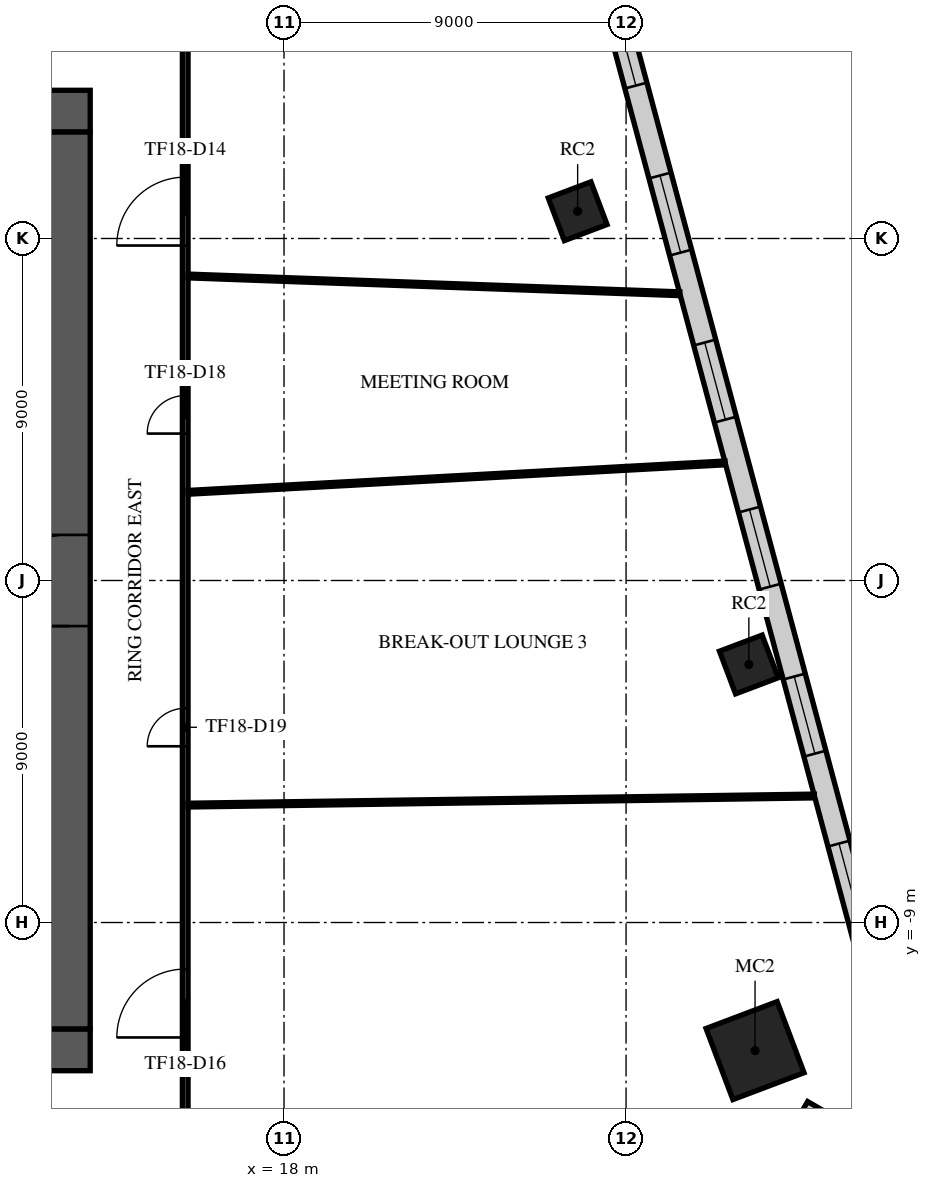
"""IFC4 building model, lengths in metres.
Left out: names, types, materials, properties, quantities, classifications, styles, units other than length and angle.
Written with IfcOpenShell. Run it as: python <this file> out.ifc"""

import sys

from ifc_helpers import new_model, si_unit, direction, frame, frame_2d, origin, origin_2d, place, context, subcontext, project, spatial, rectangle, extrude, element, fill, save


model = new_model("IFC4")
c1 = context("Model", 3, precision=1e-05, world=origin(), true_north=direction((0.0, 1.0)))
c2 = subcontext(c1, "Body", "Model", "MODEL_VIEW")
j1 = project(units=[si_unit("LENGTHUNIT", "METRE"), si_unit("PLANEANGLEUNIT", "RADIAN")], contexts=[c1])
p1 = place(None, origin())
s1 = spatial("IfcSite", under=j1, at=p1, CompositionType="ELEMENT")
p2 = place(p1, origin())
s2 = spatial("IfcBuilding", under=s1, at=p2, CompositionType="ELEMENT")
p3 = place(p2, frame((0.0, 0.0, 82.1)))
s3 = spatial("IfcBuildingStorey", under=s2, at=p3, CompositionType="ELEMENT", Elevation=82.1)
p4 = place(p3, frame((30.394, -12.371, -0.42), z_axis=(0.0, 0.0, 1.0), x_axis=(0.935491525991, 0.353349125935, 0.0)))
e1 = element("IfcColumn", 1, at=p4, inside=s3, PredefinedType="COLUMN", context=c2, shape_type="SweptSolid", body=[
    extrude(rectangle(XDim=2.0, YDim=2.0, at=origin_2d()), origin(), (0.0, 0.0, 1.0), 4.42),
])
for number, where, z_axis, x_axis in (
    (2, (30.231, -2.21, -0.42), (0.0, 0.0, 1.0), (0.935, 0.353, 0.0)),
    (3, (25.726, 9.717, -0.42), (0.0, 0.0, 1.0), (0.935, 0.353, 0.0)),
):
    element("IfcColumn", number, at=place(p3, frame(where, z_axis=z_axis, x_axis=x_axis)), inside=s3, PredefinedType="COLUMN", context=c2, shape_type="SweptSolid", body=[
        extrude(rectangle(XDim=1.2, YDim=1.2, at=origin_2d()), origin(), (0.0, 0.0, 1.0), 4.42),
    ])
p5 = place(p3, frame((-12.9, 12.35, 0.0), z_axis=(0.0, 0.0, 1.0), x_axis=(1.0, 0.0, 0.0)))
e4 = element("IfcWall", 4, at=p5, inside=s3, PredefinedType="SHEAR", context=c2, shape_type="SweptSolid", body=[
    extrude(rectangle(XDim=25.8, YDim=1.1, at=frame_2d((12.9, 0.0))), origin(), (0.0, 0.0, 1.0), 3.58),
])
p6 = place(p5, frame((11.7, 0.0, 0.0)))
e5 = element("IfcOpeningElement", 5, at=p6, cuts=e4, PredefinedType="OPENING", context=c2, shape_type="SweptSolid", body=[
    extrude(rectangle(XDim=2.4, YDim=2.4, at=frame_2d((1.2, 1.2))), frame((0.0, 0.56, 0.0), z_axis=(0.0, -1.0, 0.0), x_axis=(1.0, 0.0, 0.0)), (0.0, 0.0, 1.0), 1.12),
])
p7 = place(p5, frame((22.525, 0.0, 0.0)))
e6 = element("IfcOpeningElement", 6, at=p7, cuts=e4, PredefinedType="OPENING", context=c2, shape_type="SweptSolid", body=[
    extrude(rectangle(XDim=1.2, YDim=2.1, at=frame_2d((0.6, 1.05))), frame((0.0, 0.56, 0.0), z_axis=(0.0, -1.0, 0.0), x_axis=(1.0, 0.0, 0.0)), (0.0, 0.0, 1.0), 1.12),
])
p8 = place(p5, frame((1.5, 0.0, 0.0)))
e7 = element("IfcOpeningElement", 7, at=p8, cuts=e4, PredefinedType="OPENING", context=c2, shape_type="SweptSolid", body=[
    extrude(rectangle(XDim=1.0, YDim=2.1, at=frame_2d((0.5, 1.05))), frame((0.0, 0.56, 0.0), z_axis=(0.0, -1.0, 0.0), x_axis=(1.0, 0.0, 0.0)), (0.0, 0.0, 1.0), 1.12),
])
p9 = place(p3, frame((-12.9, -12.35, 0.0), z_axis=(0.0, 0.0, 1.0), x_axis=(1.0, 0.0, 0.0)))
e8 = element("IfcWall", 8, at=p9, inside=s3, PredefinedType="SHEAR", context=c2, shape_type="SweptSolid", body=[
    extrude(rectangle(XDim=25.8, YDim=1.1, at=frame_2d((12.9, 0.0))), origin(), (0.0, 0.0, 1.0), 3.58),
])
p10 = place(p9, frame((7.8, 0.0, 0.0)))
e9 = element("IfcOpeningElement", 9, at=p10, cuts=e8, PredefinedType="OPENING", context=c2, shape_type="SweptSolid", body=[
    extrude(rectangle(XDim=2.0, YDim=2.1, at=frame_2d((1.0, 1.05))), frame((0.0, 0.56, 0.0), z_axis=(0.0, -1.0, 0.0), x_axis=(1.0, 0.0, 0.0)), (0.0, 0.0, 1.0), 1.12),
])
p11 = place(p9, frame((17.925, 0.0, 0.0)))
e10 = element("IfcOpeningElement", 10, at=p11, cuts=e8, PredefinedType="OPENING", context=c2, shape_type="SweptSolid", body=[
    extrude(rectangle(XDim=1.2, YDim=2.1, at=frame_2d((0.6, 1.05))), frame((0.0, 0.56, 0.0), z_axis=(0.0, -1.0, 0.0), x_axis=(1.0, 0.0, 0.0)), (0.0, 0.0, 1.0), 1.12),
])
p12 = place(p9, frame((2.075, 0.0, 0.0)))
e11 = element("IfcOpeningElement", 11, at=p12, cuts=e8, PredefinedType="OPENING", context=c2, shape_type="SweptSolid", body=[
    extrude(rectangle(XDim=1.2, YDim=2.1, at=frame_2d((0.6, 1.05))), frame((0.0, 0.56, 0.0), z_axis=(0.0, -1.0, 0.0), x_axis=(1.0, 0.0, 0.0)), (0.0, 0.0, 1.0), 1.12),
])
p13 = place(p9, frame((22.525, 0.0, 0.0)))
e12 = element("IfcOpeningElement", 12, at=p13, cuts=e8, PredefinedType="OPENING", context=c2, shape_type="SweptSolid", body=[
    extrude(rectangle(XDim=1.2, YDim=2.1, at=frame_2d((0.6, 1.05))), frame((0.0, 0.56, 0.0), z_axis=(0.0, -1.0, 0.0), x_axis=(1.0, 0.0, 0.0)), (0.0, 0.0, 1.0), 1.12),
])
p14 = place(p3, frame((12.35, -11.8, 0.0), z_axis=(0.0, 0.0, 1.0), x_axis=(0.0, 1.0, 0.0)))
e13 = element("IfcWall", 13, at=p14, inside=s3, PredefinedType="SHEAR", context=c2, shape_type="SweptSolid", body=[
    extrude(rectangle(XDim=23.6, YDim=1.1, at=frame_2d((11.8, 0.0))), origin(), (0.0, 0.0, 1.0), 3.58),
])
p15 = place(p14, frame((10.6, 0.0, 0.0)))
e14 = element("IfcOpeningElement", 14, at=p15, cuts=e13, PredefinedType="OPENING", context=c2, shape_type="SweptSolid", body=[
    extrude(rectangle(XDim=2.4, YDim=2.4, at=frame_2d((1.2, 1.2))), frame((0.0, 0.56, 0.0), z_axis=(0.0, -1.0, 0.0), x_axis=(1.0, 0.0, 0.0)), (0.0, 0.0, 1.0), 1.12),
])
p16 = place(p3, frame((31.628, -13.972, 0.0), z_axis=(0.0, 0.0, 1.0), x_axis=(0.866022959057, -0.500004234368, 0.0)))
e15 = element("IfcWall", 15, at=p16, inside=s3, PredefinedType="STANDARD", context=c2, shape_type="SweptSolid", body=[
    extrude(rectangle(XDim=2.5, YDim=0.6, at=frame_2d((1.25, 0.0))), origin(), (0.0, 0.0, 1.0), 3.58),
])
p17 = place(p3, frame((34.609, -14.409, 0.0), z_axis=(0.0, 0.0, 1.0), x_axis=(-0.258819814566, 0.965925620112, 0.0)))
e16 = element("IfcWall", 16, at=p17, inside=s3, PredefinedType="STANDARD", context=c2, shape_type="SweptSolid", body=[
    extrude(rectangle(XDim=45.376, YDim=0.6, at=frame_2d((22.688, 0.0))), origin(), (0.0, 0.0, 1.0), 3.58),
])
p18 = place(p17, frame((1.163, 0.0, 0.9)))
e17 = element("IfcOpeningElement", 17, at=p18, cuts=e16, PredefinedType="OPENING", context=c2, shape_type="SweptSolid", body=[
    extrude(rectangle(XDim=2.1, YDim=2.1, at=frame_2d((1.05, 1.05))), frame((0.0, 0.31, 0.0), z_axis=(0.0, -1.0, 0.0), x_axis=(1.0, 0.0, 0.0)), (0.0, 0.0, 1.0), 0.62),
])
p19 = place(p17, frame((5.651, 0.0, 0.9)))
e18 = element("IfcOpeningElement", 18, at=p19, cuts=e16, PredefinedType="OPENING", context=c2, shape_type="SweptSolid", body=[
    extrude(rectangle(XDim=2.1, YDim=2.1, at=frame_2d((1.05, 1.05))), frame((0.0, 0.31, 0.0), z_axis=(0.0, -1.0, 0.0), x_axis=(1.0, 0.0, 0.0)), (0.0, 0.0, 1.0), 0.62),
])
p20 = place(p17, frame((10.201, 0.0, 0.9)))
e19 = element("IfcOpeningElement", 19, at=p20, cuts=e16, PredefinedType="OPENING", context=c2, shape_type="SweptSolid", body=[
    extrude(rectangle(XDim=2.1, YDim=2.1, at=frame_2d((1.05, 1.05))), frame((0.0, 0.31, 0.0), z_axis=(0.0, -1.0, 0.0), x_axis=(1.0, 0.0, 0.0)), (0.0, 0.0, 1.0), 0.62),
])
p21 = place(p17, frame((14.751, 0.0, 0.9)))
e20 = element("IfcOpeningElement", 20, at=p21, cuts=e16, PredefinedType="OPENING", context=c2, shape_type="SweptSolid", body=[
    extrude(rectangle(XDim=2.1, YDim=2.1, at=frame_2d((1.05, 1.05))), frame((0.0, 0.31, 0.0), z_axis=(0.0, -1.0, 0.0), x_axis=(1.0, 0.0, 0.0)), (0.0, 0.0, 1.0), 0.62),
])
p22 = place(p17, frame((19.301, 0.0, 0.9)))
e21 = element("IfcOpeningElement", 21, at=p22, cuts=e16, PredefinedType="OPENING", context=c2, shape_type="SweptSolid", body=[
    extrude(rectangle(XDim=2.1, YDim=2.1, at=frame_2d((1.05, 1.05))), frame((0.0, 0.31, 0.0), z_axis=(0.0, -1.0, 0.0), x_axis=(1.0, 0.0, 0.0)), (0.0, 0.0, 1.0), 0.62),
])
p23 = place(p17, frame((23.851, 0.0, 0.9)))
e22 = element("IfcOpeningElement", 22, at=p23, cuts=e16, PredefinedType="OPENING", context=c2, shape_type="SweptSolid", body=[
    extrude(rectangle(XDim=2.1, YDim=2.1, at=frame_2d((1.05, 1.05))), frame((0.0, 0.31, 0.0), z_axis=(0.0, -1.0, 0.0), x_axis=(1.0, 0.0, 0.0)), (0.0, 0.0, 1.0), 0.62),
])
p24 = place(p17, frame((28.401, 0.0, 0.9)))
e23 = element("IfcOpeningElement", 23, at=p24, cuts=e16, PredefinedType="OPENING", context=c2, shape_type="SweptSolid", body=[
    extrude(rectangle(XDim=2.1, YDim=2.1, at=frame_2d((1.05, 1.05))), frame((0.0, 0.31, 0.0), z_axis=(0.0, -1.0, 0.0), x_axis=(1.0, 0.0, 0.0)), (0.0, 0.0, 1.0), 0.62),
])
p25 = place(p17, frame((32.951, 0.0, 0.9)))
e24 = element("IfcOpeningElement", 24, at=p25, cuts=e16, PredefinedType="OPENING", context=c2, shape_type="SweptSolid", body=[
    extrude(rectangle(XDim=2.1, YDim=2.1, at=frame_2d((1.05, 1.05))), frame((0.0, 0.31, 0.0), z_axis=(0.0, -1.0, 0.0), x_axis=(1.0, 0.0, 0.0)), (0.0, 0.0, 1.0), 0.62),
])
p26 = place(p17, frame((37.501, 0.0, 0.9)))
e25 = element("IfcOpeningElement", 25, at=p26, cuts=e16, PredefinedType="OPENING", context=c2, shape_type="SweptSolid", body=[
    extrude(rectangle(XDim=2.1, YDim=2.1, at=frame_2d((1.05, 1.05))), frame((0.0, 0.31, 0.0), z_axis=(0.0, -1.0, 0.0), x_axis=(1.0, 0.0, 0.0)), (0.0, 0.0, 1.0), 0.62),
])
p27 = place(p17, frame((42.051, 0.0, 0.9)))
e26 = element("IfcOpeningElement", 26, at=p27, cuts=e16, PredefinedType="OPENING", context=c2, shape_type="SweptSolid", body=[
    extrude(rectangle(XDim=2.1, YDim=2.1, at=frame_2d((1.05, 1.05))), frame((0.0, 0.31, 0.0), z_axis=(0.0, -1.0, 0.0), x_axis=(1.0, 0.0, 0.0)), (0.0, 0.0, 1.0), 0.62),
])
p28 = place(p3, frame((15.4, -15.325, 0.0), z_axis=(0.0, 0.0, 1.0), x_axis=(0.0, 1.0, 0.0)))
e27 = element("IfcWall", 27, at=p28, inside=s3, PredefinedType="PARTITIONING", context=c2, shape_type="SweptSolid", body=[
    extrude(rectangle(XDim=30.65, YDim=0.15, at=frame_2d((15.325, 0.0))), origin(), (0.0, 0.0, 1.0), 3.08),
])
p29 = place(p28, frame((24.14, 0.0, 0.0)))
e28 = element("IfcOpeningElement", 28, at=p29, cuts=e27, PredefinedType="OPENING", context=c2, shape_type="SweptSolid", body=[
    extrude(rectangle(XDim=1.8, YDim=2.1, at=frame_2d((0.9, 1.05))), frame((0.0, 0.085, 0.0), z_axis=(0.0, -1.0, 0.0), x_axis=(1.0, 0.0, 0.0)), (0.0, 0.0, 1.0), 0.17),
])
p30 = place(p28, frame((3.3, 0.0, 0.0)))
e29 = element("IfcOpeningElement", 29, at=p30, cuts=e27, PredefinedType="OPENING", context=c2, shape_type="SweptSolid", body=[
    extrude(rectangle(XDim=1.8, YDim=2.1, at=frame_2d((0.9, 1.05))), frame((0.0, 0.085, 0.0), z_axis=(0.0, -1.0, 0.0), x_axis=(1.0, 0.0, 0.0)), (0.0, 0.0, 1.0), 0.17),
])
p31 = place(p28, frame((19.191, 0.0, 0.0)))
e30 = element("IfcOpeningElement", 30, at=p31, cuts=e27, PredefinedType="OPENING", context=c2, shape_type="SweptSolid", body=[
    extrude(rectangle(XDim=1.0, YDim=2.1, at=frame_2d((0.5, 1.05))), frame((0.0, 0.085, 0.0), z_axis=(0.0, -1.0, 0.0), x_axis=(1.0, 0.0, 0.0)), (0.0, 0.0, 1.0), 0.17),
])
p32 = place(p28, frame((10.963, 0.0, 0.0)))
e31 = element("IfcOpeningElement", 31, at=p32, cuts=e27, PredefinedType="OPENING", context=c2, shape_type="SweptSolid", body=[
    extrude(rectangle(XDim=1.0, YDim=2.1, at=frame_2d((0.5, 1.05))), frame((0.0, 0.085, 0.0), z_axis=(0.0, -1.0, 0.0), x_axis=(1.0, 0.0, 0.0)), (0.0, 0.0, 1.0), 0.17),
])
p33 = place(p3, frame((15.476, -5.911, 0.0), z_axis=(0.0, 0.0, 1.0), x_axis=(0.999893970636, 0.014561850324, 0.0)))
e32 = element("IfcWall", 32, at=p33, inside=s3, PredefinedType="PARTITIONING", context=c2, shape_type="SweptSolid", body=[
    extrude(rectangle(XDim=16.481, YDim=0.1, at=frame_2d((8.24, 0.0))), origin(), (0.0, 0.0, 1.0), 3.58),
])
p34 = place(p3, frame((15.478, 2.32, 0.0), z_axis=(0.0, 0.0, 1.0), x_axis=(0.998502061924, 0.054714096293, 0.0)))
e33 = element("IfcWall", 33, at=p34, inside=s3, PredefinedType="PARTITIONING", context=c2, shape_type="SweptSolid", body=[
    extrude(rectangle(XDim=14.149, YDim=0.1, at=frame_2d((7.075, 0.0))), origin(), (0.0, 0.0, 1.0), 3.58),
])
p35 = place(p3, frame((15.477, 8.013, 0.0), z_axis=(0.0, 0.0, 1.0), x_axis=(0.999348235862, -0.036098524609, 0.0)))
e34 = element("IfcWall", 34, at=p35, inside=s3, PredefinedType="PARTITIONING", context=c2, shape_type="SweptSolid", body=[
    extrude(rectangle(XDim=12.945, YDim=0.1, at=frame_2d((6.472, 0.0))), origin(), (0.0, 0.0, 1.0), 3.58),
])
p36 = place(p15, origin())
e35 = element("IfcDoor", 35, at=p36, inside=s3, OperationType="SINGLE_SWING_LEFT", PredefinedType="DOOR", context=c2, shape_type="SweptSolid", body=[
    extrude(rectangle(XDim=2.4, YDim=2.4, at=frame_2d((1.2, 1.2))), frame((0.0, 0.025, 0.0), z_axis=(0.0, -1.0, 0.0), x_axis=(1.0, 0.0, 0.0)), (0.0, 0.0, 1.0), 0.05),
])
fill(e14, e35)
p37 = place(p19, origin())
e36 = element("IfcWindow", 36, at=p37, inside=s3, PartitioningType="SINGLE_PANEL", PredefinedType="WINDOW", context=c2, shape_type="SweptSolid", body=[
    extrude(rectangle(XDim=2.1, YDim=2.1, at=frame_2d((1.05, 1.05))), frame((0.0, 0.03, 0.0), z_axis=(0.0, -1.0, 0.0), x_axis=(1.0, 0.0, 0.0)), (0.0, 0.0, 1.0), 0.06),
])
fill(e18, e36)
p38 = place(p20, origin())
e37 = element("IfcWindow", 37, at=p38, inside=s3, PartitioningType="SINGLE_PANEL", PredefinedType="WINDOW", context=c2, shape_type="SweptSolid", body=[
    extrude(rectangle(XDim=2.1, YDim=2.1, at=frame_2d((1.05, 1.05))), frame((0.0, 0.03, 0.0), z_axis=(0.0, -1.0, 0.0), x_axis=(1.0, 0.0, 0.0)), (0.0, 0.0, 1.0), 0.06),
])
fill(e19, e37)
p39 = place(p21, origin())
e38 = element("IfcWindow", 38, at=p39, inside=s3, PartitioningType="SINGLE_PANEL", PredefinedType="WINDOW", context=c2, shape_type="SweptSolid", body=[
    extrude(rectangle(XDim=2.1, YDim=2.1, at=frame_2d((1.05, 1.05))), frame((0.0, 0.03, 0.0), z_axis=(0.0, -1.0, 0.0), x_axis=(1.0, 0.0, 0.0)), (0.0, 0.0, 1.0), 0.06),
])
fill(e20, e38)
p40 = place(p22, origin())
e39 = element("IfcWindow", 39, at=p40, inside=s3, PartitioningType="SINGLE_PANEL", PredefinedType="WINDOW", context=c2, shape_type="SweptSolid", body=[
    extrude(rectangle(XDim=2.1, YDim=2.1, at=frame_2d((1.05, 1.05))), frame((0.0, 0.03, 0.0), z_axis=(0.0, -1.0, 0.0), x_axis=(1.0, 0.0, 0.0)), (0.0, 0.0, 1.0), 0.06),
])
fill(e21, e39)
p41 = place(p23, origin())
e40 = element("IfcWindow", 40, at=p41, inside=s3, PartitioningType="SINGLE_PANEL", PredefinedType="WINDOW", context=c2, shape_type="SweptSolid", body=[
    extrude(rectangle(XDim=2.1, YDim=2.1, at=frame_2d((1.05, 1.05))), frame((0.0, 0.03, 0.0), z_axis=(0.0, -1.0, 0.0), x_axis=(1.0, 0.0, 0.0)), (0.0, 0.0, 1.0), 0.06),
])
fill(e22, e40)
p42 = place(p24, origin())
e41 = element("IfcWindow", 41, at=p42, inside=s3, PartitioningType="SINGLE_PANEL", PredefinedType="WINDOW", context=c2, shape_type="SweptSolid", body=[
    extrude(rectangle(XDim=2.1, YDim=2.1, at=frame_2d((1.05, 1.05))), frame((0.0, 0.03, 0.0), z_axis=(0.0, -1.0, 0.0), x_axis=(1.0, 0.0, 0.0)), (0.0, 0.0, 1.0), 0.06),
])
fill(e23, e41)
p43 = place(p29, frame((1.8, 0.0, 0.0), z_axis=(0.0, 0.0, 1.0), x_axis=(-1.0, 0.0, 0.0)))
e42 = element("IfcDoor", 42, at=p43, inside=s3, OperationType="DOUBLE_DOOR_SINGLE_SWING", PredefinedType="DOOR", context=c2, shape_type="SweptSolid", body=[
    extrude(rectangle(XDim=1.8, YDim=2.1, at=frame_2d((0.9, 1.05))), frame((0.0, 0.025, 0.0), z_axis=(0.0, -1.0, 0.0), x_axis=(1.0, 0.0, 0.0)), (0.0, 0.0, 1.0), 0.05),
])
fill(e28, e42)
p44 = place(p30, frame((1.8, 0.0, 0.0), z_axis=(0.0, 0.0, 1.0), x_axis=(-1.0, 0.0, 0.0)))
e43 = element("IfcDoor", 43, at=p44, inside=s3, OperationType="DOUBLE_DOOR_SINGLE_SWING", PredefinedType="DOOR", context=c2, shape_type="SweptSolid", body=[
    extrude(rectangle(XDim=1.8, YDim=2.1, at=frame_2d((0.9, 1.05))), frame((0.0, 0.025, 0.0), z_axis=(0.0, -1.0, 0.0), x_axis=(1.0, 0.0, 0.0)), (0.0, 0.0, 1.0), 0.05),
])
fill(e29, e43)
p45 = place(p31, frame((1.0, 0.0, 0.0), z_axis=(0.0, 0.0, 1.0), x_axis=(-1.0, 0.0, 0.0)))
e44 = element("IfcDoor", 44, at=p45, inside=s3, OperationType="SINGLE_SWING_RIGHT", PredefinedType="DOOR", context=c2, shape_type="SweptSolid", body=[
    extrude(rectangle(XDim=1.0, YDim=2.1, at=frame_2d((0.5, 1.05))), frame((0.0, 0.025, 0.0), z_axis=(0.0, -1.0, 0.0), x_axis=(1.0, 0.0, 0.0)), (0.0, 0.0, 1.0), 0.05),
])
fill(e30, e44)
p46 = place(p32, frame((1.0, 0.0, 0.0), z_axis=(0.0, 0.0, 1.0), x_axis=(-1.0, 0.0, 0.0)))
e45 = element("IfcDoor", 45, at=p46, inside=s3, OperationType="SINGLE_SWING_RIGHT", PredefinedType="DOOR", context=c2, shape_type="SweptSolid", body=[
    extrude(rectangle(XDim=1.0, YDim=2.1, at=frame_2d((0.5, 1.05))), frame((0.0, 0.025, 0.0), z_axis=(0.0, -1.0, 0.0), x_axis=(1.0, 0.0, 0.0)), (0.0, 0.0, 1.0), 0.05),
])
fill(e31, e45)
save(model, sys.argv[1])
